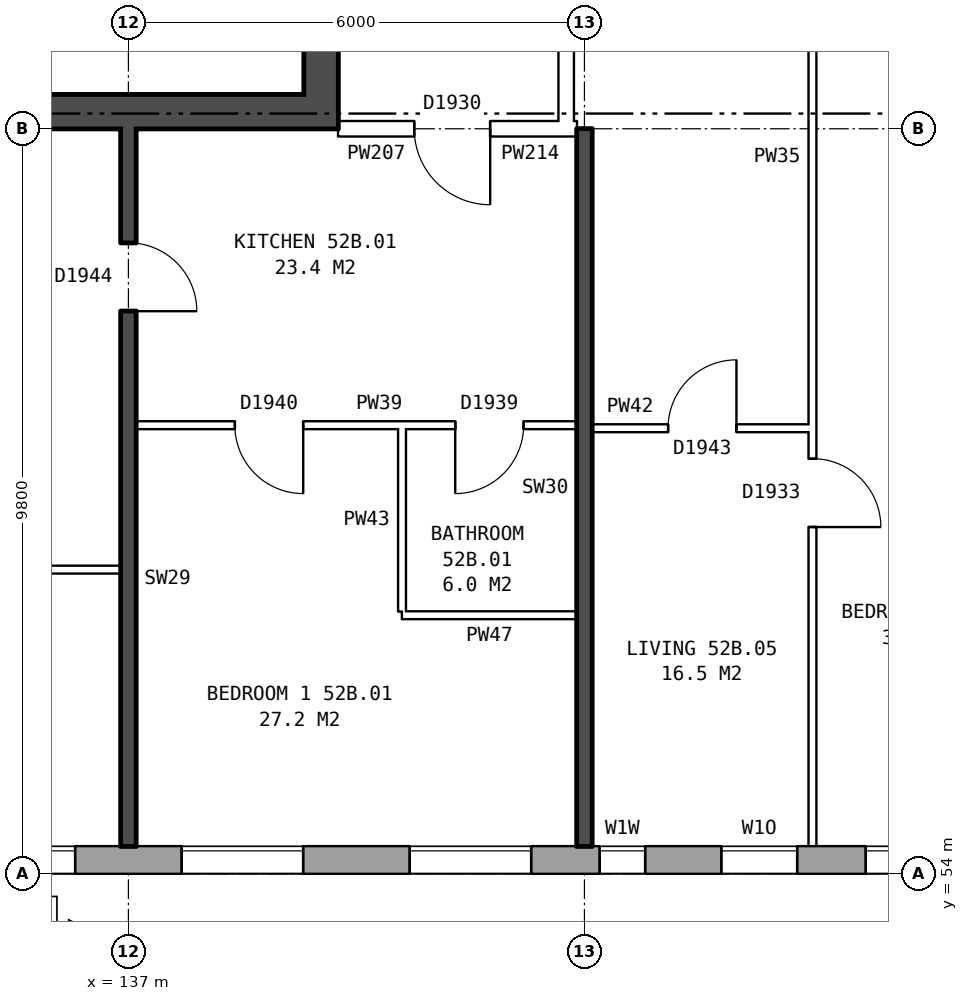
"""IFC4 building model, lengths in metres.
Left out: names, types, materials, properties, quantities, classifications, styles, units other than length and angle.
Written with IfcOpenShell. Run it as: python <this file> out.ifc"""

import sys

from ifc_helpers import new_model, si_unit, direction, frame, frame_2d, origin, place, context, subcontext, project, spatial, rectangle, extrude, element, fill, save


model = new_model("IFC4")
c1 = context("Model", 3, precision=1e-05, world=origin(), true_north=direction((0.0, 1.0)))
c2 = subcontext(c1, "Body", "Model", "MODEL_VIEW")
j1 = project(units=[si_unit("LENGTHUNIT", "METRE"), si_unit("PLANEANGLEUNIT", "RADIAN")], contexts=[c1])
p1 = place(None, origin())
s1 = spatial("IfcSite", under=j1, at=p1, CompositionType="ELEMENT")
p2 = place(p1, origin())
s2 = spatial("IfcBuilding", under=s1, at=p2, CompositionType="ELEMENT")
p3 = place(p2, frame((0.0, 0.0, 185.1)))
s3 = spatial("IfcBuildingStorey", under=s2, at=p3, CompositionType="ELEMENT", Elevation=185.1)
p4 = place(p3, frame((134.075, 54.18, 0.0), z_axis=(0.0, 0.0, 1.0), x_axis=(1.0, 0.0, 0.0)))
e1 = element("IfcWall", 1, at=p4, inside=s3, PredefinedType="STANDARD", context=c2, shape_type="SweptSolid", body=[
    extrude(rectangle(XDim=33.101, YDim=0.36, at=frame_2d((16.55, 0.0))), origin(), (0.0, 0.0, 1.0), 2.85),
])
p5 = place(p4, frame((0.625, 0.0, 0.8)))
e2 = element("IfcOpeningElement", 2, at=p5, cuts=e1, PredefinedType="OPENING", context=c2, shape_type="SweptSolid", body=[
    extrude(rectangle(XDim=1.6, YDim=1.8, at=frame_2d((0.8, 0.9))), frame((0.0, 0.19, 0.0), z_axis=(0.0, -1.0, 0.0), x_axis=(1.0, 0.0, 0.0)), (0.0, 0.0, 1.0), 0.38),
])
p6 = place(p4, frame((3.625, 0.0, 0.8)))
e3 = element("IfcOpeningElement", 3, at=p6, cuts=e1, PredefinedType="OPENING", context=c2, shape_type="SweptSolid", body=[
    extrude(rectangle(XDim=1.6, YDim=1.8, at=frame_2d((0.8, 0.9))), frame((0.0, 0.19, 0.0), z_axis=(0.0, -1.0, 0.0), x_axis=(1.0, 0.0, 0.0)), (0.0, 0.0, 1.0), 0.38),
])
p7 = place(p4, frame((6.625, 0.0, 0.8)))
e4 = element("IfcOpeningElement", 4, at=p7, cuts=e1, PredefinedType="OPENING", context=c2, shape_type="SweptSolid", body=[
    extrude(rectangle(XDim=1.6, YDim=1.8, at=frame_2d((0.8, 0.9))), frame((0.0, 0.19, 0.0), z_axis=(0.0, -1.0, 0.0), x_axis=(1.0, 0.0, 0.0)), (0.0, 0.0, 1.0), 0.38),
])
p8 = place(p4, frame((9.125, 0.0, 1.65)))
e5 = element("IfcOpeningElement", 5, at=p8, cuts=e1, PredefinedType="OPENING", context=c2, shape_type="SweptSolid", body=[
    extrude(rectangle(XDim=0.6, YDim=0.9, at=frame_2d((0.3, 0.45))), frame((0.0, 0.19, 0.0), z_axis=(0.0, -1.0, 0.0), x_axis=(1.0, 0.0, 0.0)), (0.0, 0.0, 1.0), 0.38),
])
p9 = place(p4, frame((12.625, 0.0, 0.8)))
e6 = element("IfcOpeningElement", 6, at=p9, cuts=e1, PredefinedType="OPENING", context=c2, shape_type="SweptSolid", body=[
    extrude(rectangle(XDim=1.6, YDim=1.8, at=frame_2d((0.8, 0.9))), frame((0.0, 0.19, 0.0), z_axis=(0.0, -1.0, 0.0), x_axis=(1.0, 0.0, 0.0)), (0.0, 0.0, 1.0), 0.38),
])
p10 = place(p4, frame((15.625, 0.0, 0.8)))
e7 = element("IfcOpeningElement", 7, at=p10, cuts=e1, PredefinedType="OPENING", context=c2, shape_type="SweptSolid", body=[
    extrude(rectangle(XDim=1.6, YDim=1.8, at=frame_2d((0.8, 0.9))), frame((0.0, 0.19, 0.0), z_axis=(0.0, -1.0, 0.0), x_axis=(1.0, 0.0, 0.0)), (0.0, 0.0, 1.0), 0.38),
])
p11 = place(p4, frame((18.625, 0.0, 0.8)))
e8 = element("IfcOpeningElement", 8, at=p11, cuts=e1, PredefinedType="OPENING", context=c2, shape_type="SweptSolid", body=[
    extrude(rectangle(XDim=1.6, YDim=1.8, at=frame_2d((0.8, 0.9))), frame((0.0, 0.19, 0.0), z_axis=(0.0, -1.0, 0.0), x_axis=(1.0, 0.0, 0.0)), (0.0, 0.0, 1.0), 0.38),
])
p12 = place(p4, frame((21.125, 0.0, 0.8)))
e9 = element("IfcOpeningElement", 9, at=p12, cuts=e1, PredefinedType="OPENING", context=c2, shape_type="SweptSolid", body=[
    extrude(rectangle(XDim=0.8, YDim=1.2, at=frame_2d((0.4, 0.6))), frame((0.0, 0.19, 0.0), z_axis=(0.0, -1.0, 0.0), x_axis=(1.0, 0.0, 0.0)), (0.0, 0.0, 1.0), 0.38),
])
p13 = place(p4, frame((24.625, 0.0, 0.8)))
e10 = element("IfcOpeningElement", 10, at=p13, cuts=e1, PredefinedType="OPENING", context=c2, shape_type="SweptSolid", body=[
    extrude(rectangle(XDim=1.6, YDim=1.8, at=frame_2d((0.8, 0.9))), frame((0.0, 0.19, 0.0), z_axis=(0.0, -1.0, 0.0), x_axis=(1.0, 0.0, 0.0)), (0.0, 0.0, 1.0), 0.38),
])
p14 = place(p4, frame((27.625, 0.0, 0.8)))
e11 = element("IfcOpeningElement", 11, at=p14, cuts=e1, PredefinedType="OPENING", context=c2, shape_type="SweptSolid", body=[
    extrude(rectangle(XDim=1.6, YDim=1.8, at=frame_2d((0.8, 0.9))), frame((0.0, 0.19, 0.0), z_axis=(0.0, -1.0, 0.0), x_axis=(1.0, 0.0, 0.0)), (0.0, 0.0, 1.0), 0.38),
])
p15 = place(p4, frame((30.625, 0.0, 0.8)))
e12 = element("IfcOpeningElement", 12, at=p15, cuts=e1, PredefinedType="OPENING", context=c2, shape_type="SweptSolid", body=[
    extrude(rectangle(XDim=1.6, YDim=1.8, at=frame_2d((0.8, 0.9))), frame((0.0, 0.19, 0.0), z_axis=(0.0, -1.0, 0.0), x_axis=(1.0, 0.0, 0.0)), (0.0, 0.0, 1.0), 0.38),
])
p16 = place(p4, frame((10.725, 0.0, 0.35)))
e13 = element("IfcOpeningElement", 13, at=p16, cuts=e1, PredefinedType="OPENING", context=c2, shape_type="SweptSolid", body=[
    extrude(rectangle(XDim=1.0, YDim=1.2, at=frame_2d((0.5, 0.6))), frame((0.0, 0.19, 0.0), z_axis=(0.0, -1.0, 0.0), x_axis=(1.0, 0.0, 0.0)), (0.0, 0.0, 1.0), 0.38),
])
p17 = place(p4, frame((23.525, 0.0, 1.4)))
e14 = element("IfcOpeningElement", 14, at=p17, cuts=e1, PredefinedType="OPENING", context=c2, shape_type="SweptSolid", body=[
    extrude(rectangle(XDim=0.8, YDim=1.2, at=frame_2d((0.4, 0.6))), frame((0.0, 0.19, 0.0), z_axis=(0.0, -1.0, 0.0), x_axis=(1.0, 0.0, 0.0)), (0.0, 0.0, 1.0), 0.38),
])
p18 = place(p3, frame((139.535, 63.8, 0.0), z_axis=(0.0, 0.0, 1.0), x_axis=(0.0, 1.0, 0.0)))
e15 = element("IfcWall", 15, at=p18, inside=s3, PredefinedType="SHEAR", context=c2, shape_type="SweptSolid", body=[
    extrude(rectangle(XDim=12.4, YDim=0.45, at=frame_2d((6.2, 0.0))), origin(), (0.0, 0.0, 1.0), 2.85),
])
p19 = place(p18, frame((1.325, 0.0, 0.0)))
e16 = element("IfcOpeningElement", 16, at=p19, cuts=e15, PredefinedType="OPENING", context=c2, shape_type="SweptSolid", body=[
    extrude(rectangle(XDim=1.1, YDim=2.1, at=frame_2d((0.55, 1.05))), frame((0.0, 0.235, 0.0), z_axis=(0.0, -1.0, 0.0), x_axis=(1.0, 0.0, 0.0)), (0.0, 0.0, 1.0), 0.47),
])
p20 = place(p18, frame((3.6, 0.0, 0.0)))
e17 = element("IfcOpeningElement", 17, at=p20, cuts=e15, PredefinedType="OPENING", context=c2, shape_type="SweptSolid", body=[
    extrude(rectangle(XDim=1.1, YDim=2.1, at=frame_2d((0.55, 1.05))), frame((0.0, 0.235, 0.0), z_axis=(0.0, -1.0, 0.0), x_axis=(1.0, 0.0, 0.0)), (0.0, 0.0, 1.0), 0.47),
])
p21 = place(p18, frame((5.8, 0.0, 0.0)))
e18 = element("IfcOpeningElement", 18, at=p21, cuts=e15, PredefinedType="OPENING", context=c2, shape_type="SweptSolid", body=[
    extrude(rectangle(XDim=1.1, YDim=2.1, at=frame_2d((0.55, 1.05))), frame((0.0, 0.235, 0.0), z_axis=(0.0, -1.0, 0.0), x_axis=(1.0, 0.0, 0.0)), (0.0, 0.0, 1.0), 0.47),
])
p22 = place(p18, frame((9.9, 0.0, 0.0)))
e19 = element("IfcOpeningElement", 19, at=p22, cuts=e15, PredefinedType="OPENING", context=c2, shape_type="SweptSolid", body=[
    extrude(rectangle(XDim=1.1, YDim=2.1, at=frame_2d((0.55, 1.05))), frame((0.0, 0.235, 0.0), z_axis=(0.0, -1.0, 0.0), x_axis=(1.0, 0.0, 0.0)), (0.0, 0.0, 1.0), 0.47),
])
p23 = place(p18, frame((8.125, 0.0, 0.0)))
e20 = element("IfcOpeningElement", 20, at=p23, cuts=e15, PredefinedType="OPENING", context=c2, shape_type="SweptSolid", body=[
    extrude(rectangle(XDim=0.85, YDim=2.1, at=frame_2d((0.425, 1.05))), frame((0.0, 0.235, 0.0), z_axis=(0.0, -1.0, 0.0), x_axis=(1.0, 0.0, 0.0)), (0.0, 0.0, 1.0), 0.47),
])
p24 = place(p3, frame((139.31, 64.025, 0.0), z_axis=(0.0, 0.0, 1.0), x_axis=(-1.0, 0.0, 0.0)))
e21 = element("IfcWall", 21, at=p24, inside=s3, PredefinedType="SHEAR", context=c2, shape_type="SweptSolid", body=[
    extrude(rectangle(XDim=7.5, YDim=0.45, at=frame_2d((3.75, 0.0))), origin(), (0.0, 0.0, 1.0), 2.85),
])
p25 = place(p3, frame((142.76, 63.9, 0.0), z_axis=(0.0, 0.0, 1.0), x_axis=(0.0, 1.0, 0.0)))
e22 = element("IfcWall", 22, at=p25, inside=s3, PredefinedType="PARTITIONING", context=c2, shape_type="SweptSolid", body=[
    extrude(rectangle(XDim=12.2, YDim=0.2, at=frame_2d((6.1, 0.0))), origin(), (0.0, 0.0, 1.0), 2.85),
])
p26 = place(p25, frame((5.1, 0.0, 0.0)))
e23 = element("IfcOpeningElement", 23, at=p26, cuts=e22, PredefinedType="OPENING", context=c2, shape_type="SweptSolid", body=[
    extrude(rectangle(XDim=2.0, YDim=2.1, at=frame_2d((1.0, 1.05))), frame((0.0, 0.11, 0.0), z_axis=(0.0, -1.0, 0.0), x_axis=(1.0, 0.0, 0.0)), (0.0, 0.0, 1.0), 0.22),
])
p27 = place(p3, frame((140.6, 57.4, 0.0), z_axis=(0.0, 0.0, 1.0), x_axis=(1.0, 0.0, 0.0)))
e24 = element("IfcWall", 24, at=p27, inside=s3, PredefinedType="PARTITIONING", context=c2, shape_type="SweptSolid", body=[
    extrude(rectangle(XDim=2.3, YDim=0.1, at=frame_2d((1.15, 0.0))), origin(), (0.0, 0.0, 1.0), 2.85),
])
p28 = place(p3, frame((131.36, 58.0, 0.0), z_axis=(0.0, 0.0, 1.0), x_axis=(1.0, 0.0, 0.0)))
e25 = element("IfcWall", 25, at=p28, inside=s3, PredefinedType="PARTITIONING", context=c2, shape_type="SweptSolid", body=[
    extrude(rectangle(XDim=5.54, YDim=0.1, at=frame_2d((2.77, 0.0))), origin(), (0.0, 0.0, 1.0), 2.85),
])
p29 = place(p28, frame((2.32, 0.0, 0.0)))
e26 = element("IfcOpeningElement", 26, at=p29, cuts=e25, PredefinedType="OPENING", context=c2, shape_type="SweptSolid", body=[
    extrude(rectangle(XDim=0.9, YDim=2.1, at=frame_2d((0.45, 1.05))), frame((0.0, 0.06, 0.0), z_axis=(0.0, -1.0, 0.0), x_axis=(1.0, 0.0, 0.0)), (0.0, 0.0, 1.0), 0.12),
])
p30 = place(p3, frame((143.1, 59.86, 0.0), z_axis=(0.0, 0.0, 1.0), x_axis=(1.0, 0.0, 0.0)))
e27 = element("IfcWall", 27, at=p30, inside=s3, PredefinedType="PARTITIONING", context=c2, shape_type="SweptSolid", body=[
    extrude(rectangle(XDim=2.9, YDim=0.1, at=frame_2d((1.45, 0.0))), origin(), (0.0, 0.0, 1.0), 2.85),
])
p31 = place(p30, frame((1.0, 0.0, 0.0)))
e28 = element("IfcOpeningElement", 28, at=p31, cuts=e27, PredefinedType="OPENING", context=c2, shape_type="SweptSolid", body=[
    extrude(rectangle(XDim=0.9, YDim=2.1, at=frame_2d((0.45, 1.05))), frame((0.0, 0.06, 0.0), z_axis=(0.0, -1.0, 0.0), x_axis=(1.0, 0.0, 0.0)), (0.0, 0.0, 1.0), 0.12),
])
p32 = place(p3, frame((137.1, 59.9, 0.0), z_axis=(0.0, 0.0, 1.0), x_axis=(1.0, 0.0, 0.0)))
e29 = element("IfcWall", 29, at=p32, inside=s3, PredefinedType="PARTITIONING", context=c2, shape_type="SweptSolid", body=[
    extrude(rectangle(XDim=5.8, YDim=0.1, at=frame_2d((2.9, 0.0))), origin(), (0.0, 0.0, 1.0), 2.85),
])
p33 = place(p32, frame((1.3, 0.0, 0.0)))
e30 = element("IfcOpeningElement", 30, at=p33, cuts=e29, PredefinedType="OPENING", context=c2, shape_type="SweptSolid", body=[
    extrude(rectangle(XDim=0.9, YDim=2.1, at=frame_2d((0.45, 1.05))), frame((0.0, 0.06, 0.0), z_axis=(0.0, -1.0, 0.0), x_axis=(1.0, 0.0, 0.0)), (0.0, 0.0, 1.0), 0.12),
])
p34 = place(p32, frame((4.2, 0.0, 0.0)))
e31 = element("IfcOpeningElement", 31, at=p34, cuts=e29, PredefinedType="OPENING", context=c2, shape_type="SweptSolid", body=[
    extrude(rectangle(XDim=0.9, YDim=2.1, at=frame_2d((0.45, 1.05))), frame((0.0, 0.06, 0.0), z_axis=(0.0, -1.0, 0.0), x_axis=(1.0, 0.0, 0.0)), (0.0, 0.0, 1.0), 0.12),
])
p35 = place(p3, frame((139.76, 63.8, 0.0), z_axis=(0.0, 0.0, 1.0), x_axis=(1.0, 0.0, 0.0)))
e32 = element("IfcWall", 32, at=p35, inside=s3, PredefinedType="PARTITIONING", context=c2, shape_type="SweptSolid", body=[
    extrude(rectangle(XDim=3.0, YDim=0.2, at=frame_2d((1.5, 0.0))), origin(), (0.0, 0.0, 1.0), 2.85),
])
p36 = place(p35, frame((1.0, 0.0, 0.0)))
e33 = element("IfcOpeningElement", 33, at=p36, cuts=e32, PredefinedType="OPENING", context=c2, shape_type="SweptSolid", body=[
    extrude(rectangle(XDim=1.0, YDim=2.1, at=frame_2d((0.5, 1.05))), frame((0.0, 0.11, 0.0), z_axis=(0.0, -1.0, 0.0), x_axis=(1.0, 0.0, 0.0)), (0.0, 0.0, 1.0), 0.22),
])
p37 = place(p3, frame((142.76, 63.8, 0.0), z_axis=(0.0, 0.0, 1.0), x_axis=(1.0, 0.0, 0.0)))
e34 = element("IfcWall", 34, at=p37, inside=s3, PredefinedType="PARTITIONING", context=c2, shape_type="SweptSolid", body=[
    extrude(rectangle(XDim=0.14, YDim=0.2, at=frame_2d((0.07, 0.0))), origin(), (0.0, 0.0, 1.0), 2.85),
])
p38 = place(p3, frame((137.0, 54.36, 0.0), z_axis=(0.0, 0.0, 1.0), x_axis=(0.0, 1.0, 0.0)))
e35 = element("IfcWall", 35, at=p38, inside=s3, PredefinedType="SOLIDWALL", context=c2, shape_type="SweptSolid", body=[
    extrude(rectangle(XDim=9.44, YDim=0.2, at=frame_2d((4.72, 0.0))), origin(), (0.0, 0.0, 1.0), 2.85),
])
p39 = place(p38, frame((7.04, 0.0, 0.0)))
e36 = element("IfcOpeningElement", 36, at=p39, cuts=e35, PredefinedType="OPENING", context=c2, shape_type="SweptSolid", body=[
    extrude(rectangle(XDim=0.9, YDim=2.1, at=frame_2d((0.45, 1.05))), frame((0.0, 0.11, 0.0), z_axis=(0.0, -1.0, 0.0), x_axis=(1.0, 0.0, 0.0)), (0.0, 0.0, 1.0), 0.22),
])
p40 = place(p3, frame((140.6, 57.45, 0.0), z_axis=(0.0, 0.0, 1.0), x_axis=(0.0, 1.0, 0.0)))
e37 = element("IfcWall", 37, at=p40, inside=s3, PredefinedType="PARTITIONING", context=c2, shape_type="SweptSolid", body=[
    extrude(rectangle(XDim=2.4, YDim=0.1, at=frame_2d((1.2, 0.0))), origin(), (0.0, 0.0, 1.0), 2.85),
])
p41 = place(p3, frame((143.0, 54.36, 0.0), z_axis=(0.0, 0.0, 1.0), x_axis=(0.0, 1.0, 0.0)))
e38 = element("IfcWall", 38, at=p41, inside=s3, PredefinedType="SOLIDWALL", context=c2, shape_type="SweptSolid", body=[
    extrude(rectangle(XDim=9.44, YDim=0.2, at=frame_2d((4.72, 0.0))), origin(), (0.0, 0.0, 1.0), 2.85),
])
p42 = place(p3, frame((146.0, 54.36, 0.0), z_axis=(0.0, 0.0, 1.0), x_axis=(0.0, 1.0, 0.0)))
e39 = element("IfcWall", 39, at=p42, inside=s3, PredefinedType="PARTITIONING", context=c2, shape_type="SweptSolid", body=[
    extrude(rectangle(XDim=14.34, YDim=0.1, at=frame_2d((7.17, 0.0))), origin(), (0.0, 0.0, 1.0), 2.85),
])
p43 = place(p42, frame((4.2, 0.0, 0.0)))
e40 = element("IfcOpeningElement", 40, at=p43, cuts=e39, PredefinedType="OPENING", context=c2, shape_type="SweptSolid", body=[
    extrude(rectangle(XDim=0.9, YDim=2.1, at=frame_2d((0.45, 1.05))), frame((0.0, 0.06, 0.0), z_axis=(0.0, -1.0, 0.0), x_axis=(1.0, 0.0, 0.0)), (0.0, 0.0, 1.0), 0.12),
])
p44 = place(p42, frame((13.04, 0.0, 0.0)))
e41 = element("IfcOpeningElement", 41, at=p44, cuts=e39, PredefinedType="OPENING", context=c2, shape_type="SweptSolid", body=[
    extrude(rectangle(XDim=0.9, YDim=2.1, at=frame_2d((0.45, 1.05))), frame((0.0, 0.06, 0.0), z_axis=(0.0, -1.0, 0.0), x_axis=(1.0, 0.0, 0.0)), (0.0, 0.0, 1.0), 0.12),
])
p45 = place(p5, origin())
e42 = element("IfcWindow", 42, at=p45, inside=s3, PartitioningType="SINGLE_PANEL", PredefinedType="WINDOW", context=c2, shape_type="SweptSolid", body=[
    extrude(rectangle(XDim=1.6, YDim=1.8, at=frame_2d((0.8, 0.9))), frame((0.0, 0.15, 0.0), z_axis=(0.0, -1.0, 0.0), x_axis=(1.0, 0.0, 0.0)), (0.0, 0.0, 1.0), 0.06),
])
fill(e2, e42)
p46 = place(p6, origin())
e43 = element("IfcWindow", 43, at=p46, inside=s3, PartitioningType="SINGLE_PANEL", PredefinedType="WINDOW", context=c2, shape_type="SweptSolid", body=[
    extrude(rectangle(XDim=1.6, YDim=1.8, at=frame_2d((0.8, 0.9))), frame((0.0, 0.15, 0.0), z_axis=(0.0, -1.0, 0.0), x_axis=(1.0, 0.0, 0.0)), (0.0, 0.0, 1.0), 0.06),
])
fill(e3, e43)
p47 = place(p7, origin())
e44 = element("IfcWindow", 44, at=p47, inside=s3, PartitioningType="SINGLE_PANEL", PredefinedType="WINDOW", context=c2, shape_type="SweptSolid", body=[
    extrude(rectangle(XDim=1.6, YDim=1.8, at=frame_2d((0.8, 0.9))), frame((0.0, 0.15, 0.0), z_axis=(0.0, -1.0, 0.0), x_axis=(1.0, 0.0, 0.0)), (0.0, 0.0, 1.0), 0.06),
])
fill(e4, e44)
p48 = place(p8, origin())
e45 = element("IfcWindow", 45, at=p48, inside=s3, PartitioningType="SINGLE_PANEL", PredefinedType="WINDOW", context=c2, shape_type="SweptSolid", body=[
    extrude(rectangle(XDim=0.6, YDim=0.9, at=frame_2d((0.3, 0.45))), frame((0.0, 0.15, 0.0), z_axis=(0.0, -1.0, 0.0), x_axis=(1.0, 0.0, 0.0)), (0.0, 0.0, 1.0), 0.06),
])
fill(e5, e45)
p49 = place(p9, origin())
e46 = element("IfcWindow", 46, at=p49, inside=s3, PartitioningType="SINGLE_PANEL", PredefinedType="WINDOW", context=c2, shape_type="SweptSolid", body=[
    extrude(rectangle(XDim=1.6, YDim=1.8, at=frame_2d((0.8, 0.9))), frame((0.0, 0.15, 0.0), z_axis=(0.0, -1.0, 0.0), x_axis=(1.0, 0.0, 0.0)), (0.0, 0.0, 1.0), 0.06),
])
fill(e6, e46)
p50 = place(p33, frame((0.9, 0.0, 0.0), z_axis=(0.0, 0.0, 1.0), x_axis=(-1.0, 0.0, 0.0)))
e47 = element("IfcDoor", 47, at=p50, inside=s3, OperationType="SINGLE_SWING_LEFT", PredefinedType="DOOR", context=c2, shape_type="SweptSolid", body=[
    extrude(rectangle(XDim=0.9, YDim=2.1, at=frame_2d((0.45, 1.05))), frame((0.0, 0.025, 0.0), z_axis=(0.0, -1.0, 0.0), x_axis=(1.0, 0.0, 0.0)), (0.0, 0.0, 1.0), 0.05),
])
fill(e30, e47)
p51 = place(p36, frame((1.0, 0.0, 0.0), z_axis=(0.0, 0.0, 1.0), x_axis=(-1.0, 0.0, 0.0)))
e48 = element("IfcDoor", 48, at=p51, inside=s3, OperationType="SINGLE_SWING_LEFT", PredefinedType="DOOR", context=c2, shape_type="SweptSolid", body=[
    extrude(rectangle(XDim=1.0, YDim=2.1, at=frame_2d((0.5, 1.05))), frame((0.0, 0.025, 0.0), z_axis=(0.0, -1.0, 0.0), x_axis=(1.0, 0.0, 0.0)), (0.0, 0.0, 1.0), 0.05),
])
fill(e33, e48)
p52 = place(p39, frame((0.9, 0.0, 0.0), z_axis=(0.0, 0.0, 1.0), x_axis=(-1.0, 0.0, 0.0)))
e49 = element("IfcDoor", 49, at=p52, inside=s3, OperationType="SINGLE_SWING_RIGHT", PredefinedType="DOOR", context=c2, shape_type="SweptSolid", body=[
    extrude(rectangle(XDim=0.9, YDim=2.1, at=frame_2d((0.45, 1.05))), frame((0.0, 0.025, 0.0), z_axis=(0.0, -1.0, 0.0), x_axis=(1.0, 0.0, 0.0)), (0.0, 0.0, 1.0), 0.05),
])
fill(e36, e49)
p53 = place(p34, frame((0.9, 0.0, 0.0), z_axis=(0.0, 0.0, 1.0), x_axis=(-1.0, 0.0, 0.0)))
e50 = element("IfcDoor", 50, at=p53, inside=s3, OperationType="SINGLE_SWING_RIGHT", PredefinedType="DOOR", context=c2, shape_type="SweptSolid", body=[
    extrude(rectangle(XDim=0.9, YDim=2.1, at=frame_2d((0.45, 1.05))), frame((0.0, 0.025, 0.0), z_axis=(0.0, -1.0, 0.0), x_axis=(1.0, 0.0, 0.0)), (0.0, 0.0, 1.0), 0.05),
])
fill(e31, e50)
p54 = place(p43, frame((0.9, 0.0, 0.0), z_axis=(0.0, 0.0, 1.0), x_axis=(-1.0, 0.0, 0.0)))
e51 = element("IfcDoor", 51, at=p54, inside=s3, OperationType="SINGLE_SWING_RIGHT", PredefinedType="DOOR", context=c2, shape_type="SweptSolid", body=[
    extrude(rectangle(XDim=0.9, YDim=2.1, at=frame_2d((0.45, 1.05))), frame((0.0, 0.025, 0.0), z_axis=(0.0, -1.0, 0.0), x_axis=(1.0, 0.0, 0.0)), (0.0, 0.0, 1.0), 0.05),
])
fill(e40, e51)
p55 = place(p31, origin())
e52 = element("IfcDoor", 52, at=p55, inside=s3, OperationType="SINGLE_SWING_RIGHT", PredefinedType="DOOR", context=c2, shape_type="SweptSolid", body=[
    extrude(rectangle(XDim=0.9, YDim=2.1, at=frame_2d((0.45, 1.05))), frame((0.0, 0.025, 0.0), z_axis=(0.0, -1.0, 0.0), x_axis=(1.0, 0.0, 0.0)), (0.0, 0.0, 1.0), 0.05),
])
fill(e28, e52)
p56 = place(p16, origin())
e53 = element("IfcWindow", 53, at=p56, inside=s3, PartitioningType="SINGLE_PANEL", PredefinedType="WINDOW", context=c2, shape_type="SweptSolid", body=[
    extrude(rectangle(XDim=1.0, YDim=1.2, at=frame_2d((0.5, 0.6))), frame((0.0, 0.15, 0.0), z_axis=(0.0, -1.0, 0.0), x_axis=(1.0, 0.0, 0.0)), (0.0, 0.0, 1.0), 0.06),
])
fill(e13, e53)
save(model, sys.argv[1])
